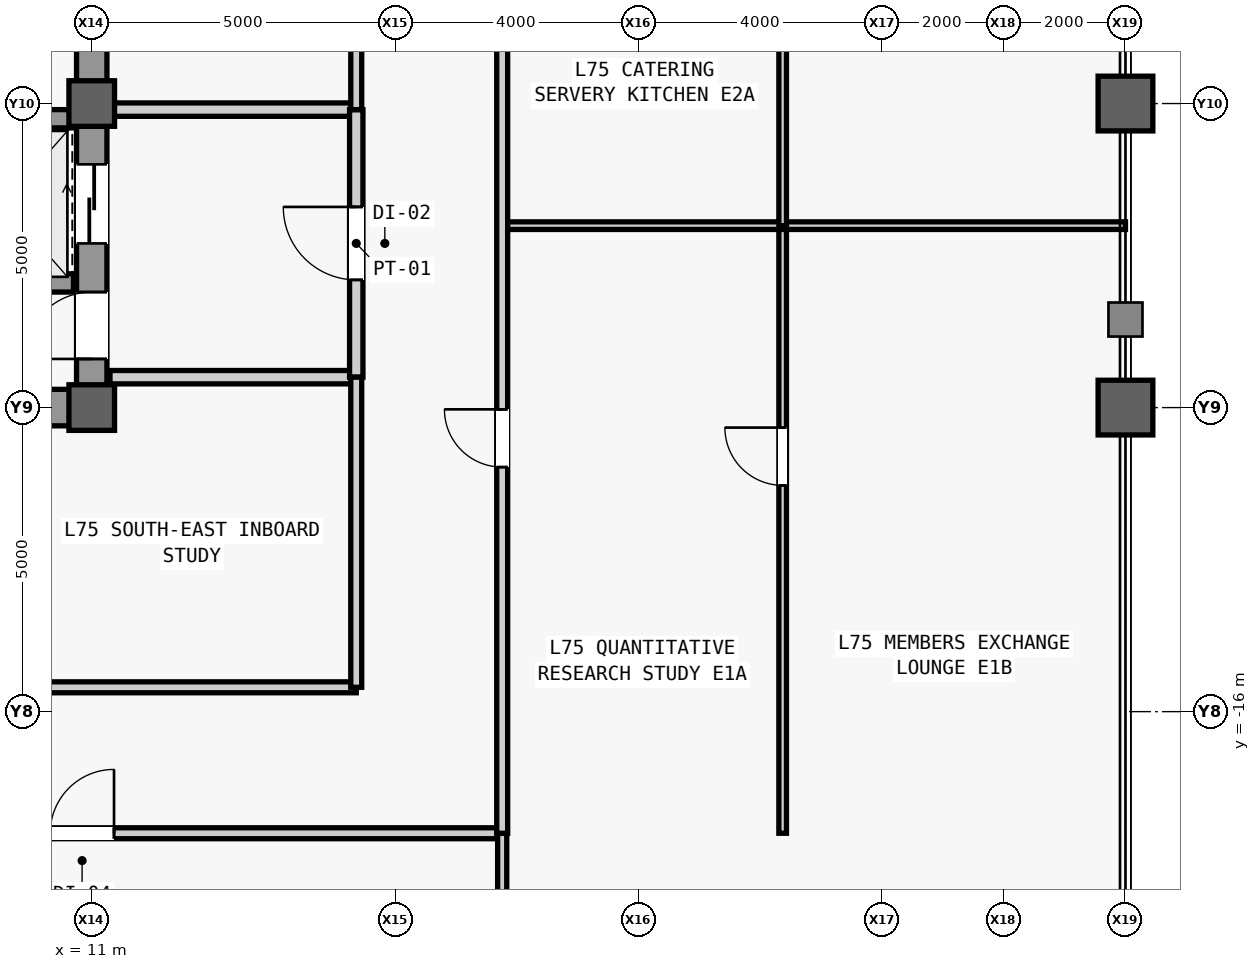
"""IFC4 building model, lengths in metres.
Left out: names, types, materials, properties, quantities, classifications, styles, units other than length and angle.
Written with IfcOpenShell. Run it as: python <this file> out.ifc"""

import sys

from ifc_helpers import new_model, si_unit, direction, frame, frame_2d, origin, origin_2d, place, context, subcontext, project, spatial, rectangle, hollow_rectangle, extrude, source, transform, mapped, element, fill, save


model = new_model("IFC4")
c1 = context("Model", 3, precision=1e-05, world=origin(), true_north=direction((0.0, 1.0)))
c2 = subcontext(c1, "Body", "Model", "MODEL_VIEW")
j1 = project(units=[si_unit("LENGTHUNIT", "METRE"), si_unit("PLANEANGLEUNIT", "RADIAN")], contexts=[c1])
p1 = place(None, origin())
s1 = spatial("IfcSite", under=j1, at=p1, CompositionType="ELEMENT")
p2 = place(p1, origin())
s2 = spatial("IfcBuilding", under=s1, at=p2, CompositionType="ELEMENT")
p3 = place(p2, frame((0.0, 0.0, 317.5)))
s3 = spatial("IfcBuildingStorey", under=s2, at=p3, CompositionType="ELEMENT", Elevation=317.5)
m1 = source(origin(), c2, "Body", "SweptSolid", [
    extrude(rectangle(XDim=22.0, YDim=0.5, at=frame_2d((11.0, 0.0))), origin(), (0.0, 0.0, 1.0), 3.78),
])
p4 = place(p3, frame((11.0, -11.0, 0.0), z_axis=(0.0, 0.0, 1.0), x_axis=(0.0, 1.0, 0.0)))
e1 = element("IfcWall", 1, at=p4, inside=s3, PredefinedType="SHEAR", context=c2, shape_type="MappedRepresentation", body=[
    mapped(m1, transform((0.0, 0.0, 0.0), scale=1.0)),
])
m2 = source(origin(), c2, "Body", "SweptSolid", [
    extrude(rectangle(XDim=1.1, YDim=2.2, at=frame_2d((0.55, 1.1))), frame((0.0, 0.26, 0.0), z_axis=(0.0, -1.0, 0.0), x_axis=(1.0, 0.0, 0.0)), (0.0, 0.0, 1.0), 0.52),
])
p5 = place(p4, frame((0.8, 0.0, 0.0)))
e2 = element("IfcOpeningElement", 2, at=p5, cuts=e1, PredefinedType="OPENING", context=c2, shape_type="MappedRepresentation", body=[
    mapped(m2, transform((0.0, 0.0, 0.0), scale=1.0)),
])
m3 = source(origin(), c2, "Body", "SweptSolid", [
    extrude(rectangle(XDim=0.9, YDim=2.15, at=frame_2d((0.45, 1.075))), frame((0.0, 0.26, 0.0), z_axis=(0.0, -1.0, 0.0), x_axis=(1.0, 0.0, 0.0)), (0.0, 0.0, 1.0), 0.52),
])
p6 = place(p4, frame((6.85, 0.0, 0.0)))
e3 = element("IfcOpeningElement", 3, at=p6, cuts=e1, PredefinedType="OPENING", context=c2, shape_type="MappedRepresentation", body=[
    mapped(m3, transform((0.0, 0.0, 0.0), scale=1.0)),
])
m4 = source(origin(), c2, "Body", "SweptSolid", [
    extrude(rectangle(XDim=1.2, YDim=2.3, at=frame_2d((0.6, 1.15))), frame((0.0, 0.26, 0.0), z_axis=(0.0, -1.0, 0.0), x_axis=(1.0, 0.0, 0.0)), (0.0, 0.0, 1.0), 0.52),
])
p7 = place(p4, frame((17.6, 0.0, 0.0)))
e4 = element("IfcOpeningElement", 4, at=p7, cuts=e1, PredefinedType="OPENING", context=c2, shape_type="MappedRepresentation", body=[
    mapped(m4, transform((0.0, 0.0, 0.0), scale=1.0)),
])
p8 = place(p4, frame((19.6, 0.0, 0.0)))
e5 = element("IfcOpeningElement", 5, at=p8, cuts=e1, PredefinedType="OPENING", context=c2, shape_type="MappedRepresentation", body=[
    mapped(m4, transform((0.0, 0.0, 0.0), scale=1.0)),
])
m5 = source(origin(), c2, "Body", "SweptSolid", [
    extrude(rectangle(XDim=1.3, YDim=2.3, at=frame_2d((0.65, 1.15))), frame((0.0, 0.26, 0.0), z_axis=(0.0, -1.0, 0.0), x_axis=(1.0, 0.0, 0.0)), (0.0, 0.0, 1.0), 0.52),
])
p9 = place(p4, frame((2.7, 0.0, 0.0)))
e6 = element("IfcOpeningElement", 6, at=p9, cuts=e1, PredefinedType="OPENING", context=c2, shape_type="MappedRepresentation", body=[
    mapped(m5, transform((0.0, 0.0, 0.0), scale=1.0)),
])
p10 = place(p4, frame((13.35, 0.0, 0.0)))
e7 = element("IfcOpeningElement", 7, at=p10, cuts=e1, PredefinedType="OPENING", context=c2, shape_type="MappedRepresentation", body=[
    mapped(m5, transform((0.0, 0.0, 0.0), scale=1.0)),
])
m6 = source(origin(), c2, "Body", "SweptSolid", [
    extrude(rectangle(XDim=5.9, YDim=0.6, at=frame_2d((2.95, 0.0))), origin(), (0.0, 0.0, 1.0), 3.78),
])
p11 = place(p3, frame((4.85, -11.0, 0.0), z_axis=(0.0, 0.0, 1.0), x_axis=(1.0, 0.0, 0.0)))
e8 = element("IfcWall", 8, at=p11, inside=s3, PredefinedType="SHEAR", context=c2, shape_type="MappedRepresentation", body=[
    mapped(m6, transform((0.0, 0.0, 0.0), scale=1.0)),
])
m7 = source(origin(), c2, "Body", "SweptSolid", [
    extrude(rectangle(XDim=0.75, YDim=0.75, at=origin_2d()), origin(), (0.0, 0.0, 1.0), 4.0),
])
for number, where, z_axis, x_axis in (
    (9, (11.0, -11.0, 0.0), (0.0, 0.0, 1.0), (1.0, 0.0, 0.0)),
    (10, (11.0, -6.0, 0.0), (0.0, 0.0, 1.0), (1.0, 0.0, 0.0)),
):
    element("IfcColumn", number, at=place(p3, frame(where, z_axis=z_axis, x_axis=x_axis)), inside=s3, PredefinedType="COLUMN", context=c2, shape_type="MappedRepresentation", body=[
        mapped(m7, transform((0.0, 0.0, 0.0), scale=1.0)),
    ])
m8 = source(origin(), c2, "Body", "SweptSolid", [
    extrude(hollow_rectangle(XDim=0.9, YDim=0.9, WallThickness=0.05, at=origin_2d()), origin(), (0.0, 0.0, 1.0), 4.0),
])
for number, where, z_axis, x_axis in (
    (11, (28.0, -11.0, 0.0), (0.0, 0.0, 1.0), (1.0, 0.0, 0.0)),
    (12, (28.0, -6.0, 0.0), (0.0, 0.0, 1.0), (1.0, 0.0, 0.0)),
):
    element("IfcColumn", number, at=place(p3, frame(where, z_axis=z_axis, x_axis=x_axis)), inside=s3, PredefinedType="COLUMN", context=c2, shape_type="MappedRepresentation", body=[
        mapped(m8, transform((0.0, 0.0, 0.0), scale=1.0)),
    ])
m9 = source(origin(), c2, "Body", "SweptSolid", [
    extrude(rectangle(XDim=2.2, YDim=0.3, at=frame_2d((1.1, 0.0))), origin(), (0.0, 0.0, 1.0), 3.78),
])
for number, where, z_axis, x_axis in (
    (13, (8.5, -8.95, 0.0), (0.0, 0.0, 1.0), (1.0, 0.0, 0.0)),
    (14, (8.5, -6.25, 0.0), (0.0, 0.0, 1.0), (1.0, 0.0, 0.0)),
):
    element("IfcWall", number, at=place(p3, frame(where, z_axis=z_axis, x_axis=x_axis)), inside=s3, PredefinedType="SHEAR", context=c2, shape_type="MappedRepresentation", body=[
        mapped(m9, transform((0.0, 0.0, 0.0), scale=1.0)),
    ])
m10 = source(origin(), c2, "Body", "SweptSolid", [
    extrude(rectangle(XDim=4.05, YDim=0.22, at=frame_2d((2.025, 0.0))), origin(), (0.0, 0.0, 1.0), 3.78),
])
p12 = place(p3, frame((11.3, -10.5, 0.0), z_axis=(0.0, 0.0, 1.0), x_axis=(1.0, 0.0, 0.0)))
e15 = element("IfcWall", 15, at=p12, inside=s3, PredefinedType="PARTITIONING", context=c2, shape_type="MappedRepresentation", body=[
    mapped(m10, transform((0.0, 0.0, 0.0), scale=1.0)),
])
m11 = source(origin(), c2, "Body", "SweptSolid", [
    extrude(rectangle(XDim=4.05, YDim=0.22, at=frame_2d((2.025, 0.0))), origin(), (0.0, 0.0, 1.0), 3.085),
])
p13 = place(p3, frame((11.3, -6.1, 0.0), z_axis=(0.0, 0.0, 1.0), x_axis=(1.0, 0.0, 0.0)))
e16 = element("IfcWall", 16, at=p13, inside=s3, PredefinedType="PARTITIONING", context=c2, shape_type="MappedRepresentation", body=[
    mapped(m11, transform((0.0, 0.0, 0.0), scale=1.0)),
])
m12 = source(origin(), c2, "Body", "SweptSolid", [
    extrude(rectangle(XDim=4.4, YDim=0.22, at=frame_2d((2.2, 0.0))), origin(), (0.0, 0.0, 1.0), 3.78),
])
p14 = place(p3, frame((15.35, -10.5, 0.0), z_axis=(0.0, 0.0, 1.0), x_axis=(0.0, 1.0, 0.0)))
e17 = element("IfcWall", 17, at=p14, inside=s3, PredefinedType="PARTITIONING", context=c2, shape_type="MappedRepresentation", body=[
    mapped(m12, transform((0.0, 0.0, 0.0), scale=1.0)),
])
m13 = source(origin(), c2, "Body", "SweptSolid", [
    extrude(rectangle(XDim=1.2, YDim=2.2, at=frame_2d((0.6, 1.1))), frame((0.0, 0.12, 0.0), z_axis=(0.0, -1.0, 0.0), x_axis=(1.0, 0.0, 0.0)), (0.0, 0.0, 1.0), 0.24),
])
p15 = place(p14, frame((1.6, 0.0, 0.0)))
e18 = element("IfcOpeningElement", 18, at=p15, cuts=e17, PredefinedType="OPENING", context=c2, shape_type="MappedRepresentation", body=[
    mapped(m13, transform((0.0, 0.0, 0.0), scale=1.0)),
])
m14 = source(origin(), c2, "Body", "SweptSolid", [
    extrude(rectangle(XDim=16.6, YDim=0.18, at=frame_2d((8.3, 0.0))), origin(), (0.0, 0.0, 1.0), 3.78),
])
p16 = place(p3, frame((15.35, -6.1, 0.0), z_axis=(0.0, 0.0, 1.0), x_axis=(0.0, 1.0, 0.0)))
e19 = element("IfcWall", 19, at=p16, inside=s3, PredefinedType="PARTITIONING", context=c2, shape_type="MappedRepresentation", body=[
    mapped(m14, transform((0.0, 0.0, 0.0), scale=1.0)),
])
m15 = source(origin(), c2, "Body", "SweptSolid", [
    extrude(rectangle(XDim=1.8, YDim=2.25, at=frame_2d((0.9, 1.125))), frame((0.0, 0.1, 0.0), z_axis=(0.0, -1.0, 0.0), x_axis=(1.0, 0.0, 0.0)), (0.0, 0.0, 1.0), 0.2),
])
p17 = place(p16, frame((2.7, 0.0, 0.0)))
e20 = element("IfcOpeningElement", 20, at=p17, cuts=e19, PredefinedType="OPENING", context=c2, shape_type="MappedRepresentation", body=[
    mapped(m15, transform((0.0, 0.0, 0.0), scale=1.0)),
])
p18 = place(p16, frame((13.0, 0.0, 0.0)))
e21 = element("IfcOpeningElement", 21, at=p18, cuts=e19, PredefinedType="OPENING", context=c2, shape_type="MappedRepresentation", body=[
    mapped(m15, transform((0.0, 0.0, 0.0), scale=1.0)),
])
m16 = source(origin(), c2, "Body", "SweptSolid", [
    extrude(rectangle(XDim=14.05, YDim=0.18, at=frame_2d((7.025, 0.0))), origin(), (0.0, 0.0, 1.0), 3.78),
])
p19 = place(p3, frame((1.3, -15.6, 0.0), z_axis=(0.0, 0.0, 1.0), x_axis=(1.0, 0.0, 0.0)))
e22 = element("IfcWall", 22, at=p19, inside=s3, PredefinedType="PARTITIONING", context=c2, shape_type="MappedRepresentation", body=[
    mapped(m16, transform((0.0, 0.0, 0.0), scale=1.0)),
])
m17 = source(origin(), c2, "Body", "SweptSolid", [
    extrude(rectangle(XDim=0.9, YDim=2.15, at=frame_2d((0.45, 1.075))), frame((0.0, 0.1, 0.0), z_axis=(0.0, -1.0, 0.0), x_axis=(1.0, 0.0, 0.0)), (0.0, 0.0, 1.0), 0.2),
])
p20 = place(p19, frame((6.25, 0.0, 0.0)))
e23 = element("IfcOpeningElement", 23, at=p20, cuts=e22, PredefinedType="OPENING", context=c2, shape_type="MappedRepresentation", body=[
    mapped(m17, transform((0.0, 0.0, 0.0), scale=1.0)),
])
m18 = source(origin(), c2, "Body", "SweptSolid", [
    extrude(rectangle(XDim=5.1, YDim=0.18, at=frame_2d((2.55, 0.0))), origin(), (0.0, 0.0, 1.0), 3.78),
])
p21 = place(p3, frame((15.35, -15.6, 0.0), z_axis=(0.0, 0.0, 1.0), x_axis=(0.0, 1.0, 0.0)))
e24 = element("IfcWall", 24, at=p21, inside=s3, PredefinedType="PARTITIONING", context=c2, shape_type="MappedRepresentation", body=[
    mapped(m18, transform((0.0, 0.0, 0.0), scale=1.0)),
])
m19 = source(origin(), c2, "Body", "SweptSolid", [
    extrude(rectangle(XDim=37.55, YDim=0.18, at=frame_2d((18.775, 0.0))), origin(), (0.0, 0.0, 1.0), 3.78),
])
p22 = place(p3, frame((-19.8, -18.0, 0.0), z_axis=(0.0, 0.0, 1.0), x_axis=(1.0, 0.0, 0.0)))
e25 = element("IfcWall", 25, at=p22, inside=s3, PredefinedType="PARTITIONING", context=c2, shape_type="MappedRepresentation", body=[
    mapped(m19, transform((0.0, 0.0, 0.0), scale=1.0)),
])
m20 = source(origin(), c2, "Body", "SweptSolid", [
    extrude(rectangle(XDim=1.05, YDim=2.2, at=frame_2d((0.525, 1.1))), frame((0.0, 0.1, 0.0), z_axis=(0.0, -1.0, 0.0), x_axis=(1.0, 0.0, 0.0)), (0.0, 0.0, 1.0), 0.2),
])
p23 = place(p22, frame((5.983, 0.0, 0.0)))
e26 = element("IfcOpeningElement", 26, at=p23, cuts=e25, PredefinedType="OPENING", context=c2, shape_type="MappedRepresentation", body=[
    mapped(m20, transform((0.0, 0.0, 0.0), scale=1.0)),
])
p24 = place(p22, frame((17.875, 0.0, 0.0)))
e27 = element("IfcOpeningElement", 27, at=p24, cuts=e25, PredefinedType="OPENING", context=c2, shape_type="MappedRepresentation", body=[
    mapped(m20, transform((0.0, 0.0, 0.0), scale=1.0)),
])
p25 = place(p22, frame((30.116, 0.0, 0.0)))
e28 = element("IfcOpeningElement", 28, at=p25, cuts=e25, PredefinedType="OPENING", context=c2, shape_type="MappedRepresentation", body=[
    mapped(m20, transform((0.0, 0.0, 0.0), scale=1.0)),
])
m21 = source(origin(), c2, "Body", "SweptSolid", [
    extrude(rectangle(XDim=10.0, YDim=0.15, at=frame_2d((5.0, 0.0))), origin(), (0.0, 0.0, 1.0), 3.78),
])
p26 = place(p3, frame((17.75, -28.0, 0.0), z_axis=(0.0, 0.0, 1.0), x_axis=(0.0, 1.0, 0.0)))
e29 = element("IfcWall", 29, at=p26, inside=s3, PredefinedType="PARTITIONING", context=c2, shape_type="MappedRepresentation", body=[
    mapped(m21, transform((0.0, 0.0, 0.0), scale=1.0)),
])
m22 = source(origin(), c2, "Body", "SweptSolid", [
    extrude(rectangle(XDim=9.992, YDim=0.125, at=frame_2d((4.996, 0.0))), origin(), (0.0, 0.0, 1.0), 3.164),
])
p27 = place(p3, frame((22.363, -18.0, 0.0), z_axis=(0.0, 0.0, 1.0), x_axis=(0.0, 1.0, 0.0)))
e30 = element("IfcWall", 30, at=p27, inside=s3, PredefinedType="PARTITIONING", context=c2, shape_type="MappedRepresentation", body=[
    mapped(m22, transform((0.0, 0.0, 0.0), scale=1.0)),
])
m23 = source(origin(), c2, "Body", "SweptSolid", [
    extrude(rectangle(XDim=0.95, YDim=2.15, at=frame_2d((0.475, 1.075))), frame((0.0, 0.073, 0.0), z_axis=(0.0, -1.0, 0.0), x_axis=(1.0, 0.0, 0.0)), (0.0, 0.0, 1.0), 0.145),
])
p28 = place(p27, frame((5.721, 0.0, 0.0)))
e31 = element("IfcOpeningElement", 31, at=p28, cuts=e30, PredefinedType="OPENING", context=c2, shape_type="MappedRepresentation", body=[
    mapped(m23, transform((0.0, 0.0, 0.0), scale=1.0)),
])
m24 = source(origin(), c2, "Body", "SweptSolid", [
    extrude(rectangle(XDim=10.25, YDim=0.125, at=frame_2d((5.125, 0.0))), origin(), (0.0, 0.0, 1.0), 3.78),
])
p29 = place(p3, frame((17.75, -8.008, 0.0), z_axis=(0.0, 0.0, 1.0), x_axis=(1.0, 0.0, 0.0)))
e32 = element("IfcWall", 32, at=p29, inside=s3, PredefinedType="PARTITIONING", context=c2, shape_type="MappedRepresentation", body=[
    mapped(m24, transform((0.0, 0.0, 0.0), scale=1.0)),
])
m25 = source(origin(), c2, "Body", "SweptSolid", [
    extrude(rectangle(XDim=9.928, YDim=0.125, at=frame_2d((4.964, 0.0))), origin(), (0.0, 0.0, 1.0), 3.78),
])
p30 = place(p3, frame((22.363, -8.008, 0.0), z_axis=(0.0, 0.0, 1.0), x_axis=(0.0, 1.0, 0.0)))
e33 = element("IfcWall", 33, at=p30, inside=s3, PredefinedType="PARTITIONING", context=c2, shape_type="MappedRepresentation", body=[
    mapped(m25, transform((0.0, 0.0, 0.0), scale=1.0)),
])
p31 = place(p30, frame((4.489, 0.0, 0.0)))
e34 = element("IfcOpeningElement", 34, at=p31, cuts=e33, PredefinedType="OPENING", context=c2, shape_type="MappedRepresentation", body=[
    mapped(m23, transform((0.0, 0.0, 0.0), scale=1.0)),
])
m26 = source(origin(), c2, "Body", "SweptSolid", [
    extrude(rectangle(XDim=40.5, YDim=0.18, at=frame_2d((20.25, 0.0))), origin(), (0.0, 0.0, 1.0), 3.78),
])
p32 = place(p3, frame((17.75, -18.0, 0.0), z_axis=(0.0, 0.0, 1.0), x_axis=(0.0, 1.0, 0.0)))
e35 = element("IfcWall", 35, at=p32, inside=s3, PredefinedType="PARTITIONING", context=c2, shape_type="MappedRepresentation", body=[
    mapped(m26, transform((0.0, 0.0, 0.0), scale=1.0)),
])
m27 = source(origin(), c2, "Body", "SweptSolid", [
    extrude(rectangle(XDim=0.95, YDim=2.15, at=frame_2d((0.475, 1.075))), frame((0.0, 0.1, 0.0), z_axis=(0.0, -1.0, 0.0), x_axis=(1.0, 0.0, 0.0)), (0.0, 0.0, 1.0), 0.2),
])
p33 = place(p32, frame((6.021, 0.0, 0.0)))
e36 = element("IfcOpeningElement", 36, at=p33, cuts=e35, PredefinedType="OPENING", context=c2, shape_type="MappedRepresentation", body=[
    mapped(m27, transform((0.0, 0.0, 0.0), scale=1.0)),
])
p34 = place(p32, frame((14.481, 0.0, 0.0)))
e37 = element("IfcOpeningElement", 37, at=p34, cuts=e35, PredefinedType="OPENING", context=c2, shape_type="MappedRepresentation", body=[
    mapped(m27, transform((0.0, 0.0, 0.0), scale=1.0)),
])
p35 = place(p32, frame((24.985, 0.0, 0.0)))
e38 = element("IfcOpeningElement", 38, at=p35, cuts=e35, PredefinedType="OPENING", context=c2, shape_type="MappedRepresentation", body=[
    mapped(m27, transform((0.0, 0.0, 0.0), scale=1.0)),
])
m28 = source(origin(), c2, "Body", "SweptSolid", [
    extrude(rectangle(XDim=1.1, YDim=2.2, at=frame_2d((0.55, 1.1))), frame((0.0, 0.025, 0.0), z_axis=(0.0, -1.0, 0.0), x_axis=(1.0, 0.0, 0.0)), (0.0, 0.0, 1.0), 0.05),
])
p36 = place(p5, origin())
e39 = element("IfcDoor", 39, at=p36, inside=s3, OperationType="SINGLE_SWING_LEFT", PredefinedType="DOOR", context=c2, shape_type="MappedRepresentation", body=[
    mapped(m28, transform((0.0, 0.0, 0.0), scale=1.0)),
])
fill(e2, e39)
m29 = source(origin(), c2, "Body", "SweptSolid", [
    extrude(rectangle(XDim=1.2, YDim=2.2, at=frame_2d((0.6, 1.1))), frame((0.0, 0.025, 0.0), z_axis=(0.0, -1.0, 0.0), x_axis=(1.0, 0.0, 0.0)), (0.0, 0.0, 1.0), 0.05),
])
p37 = place(p15, origin())
e40 = element("IfcDoor", 40, at=p37, inside=s3, OperationType="SINGLE_SWING_RIGHT", PredefinedType="DOOR", context=c2, shape_type="MappedRepresentation", body=[
    mapped(m29, transform((0.0, 0.0, 0.0), scale=1.0)),
])
fill(e18, e40)
m30 = source(origin(), c2, "Body", "SweptSolid", [
    extrude(rectangle(XDim=1.05, YDim=2.2, at=frame_2d((0.525, 1.1))), frame((0.0, 0.025, 0.0), z_axis=(0.0, -1.0, 0.0), x_axis=(1.0, 0.0, 0.0)), (0.0, 0.0, 1.0), 0.05),
])
p38 = place(p25, origin())
e41 = element("IfcDoor", 41, at=p38, inside=s3, OperationType="SINGLE_SWING_RIGHT", PredefinedType="DOOR", context=c2, shape_type="MappedRepresentation", body=[
    mapped(m30, transform((0.0, 0.0, 0.0), scale=1.0)),
])
fill(e28, e41)
m31 = source(origin(), c2, "Body", "SweptSolid", [
    extrude(rectangle(XDim=0.95, YDim=2.15, at=frame_2d((0.475, 1.075))), frame((0.0, 0.025, 0.0), z_axis=(0.0, -1.0, 0.0), x_axis=(1.0, 0.0, 0.0)), (0.0, 0.0, 1.0), 0.05),
])
p39 = place(p28, origin())
e42 = element("IfcDoor", 42, at=p39, inside=s3, OperationType="SINGLE_SWING_RIGHT", PredefinedType="DOOR", context=c2, shape_type="MappedRepresentation", body=[
    mapped(m31, transform((0.0, 0.0, 0.0), scale=1.0)),
])
fill(e31, e42)
p40 = place(p33, origin())
e43 = element("IfcDoor", 43, at=p40, inside=s3, OperationType="SINGLE_SWING_RIGHT", PredefinedType="DOOR", context=c2, shape_type="MappedRepresentation", body=[
    mapped(m31, transform((0.0, 0.0, 0.0), scale=1.0)),
])
fill(e36, e43)
m32 = source(origin(), c2, "Body", "SweptSolid", [
    extrude(rectangle(XDim=1.3, YDim=2.3, at=frame_2d((0.65, 1.15))), frame((0.0, 0.025, 0.0), z_axis=(0.0, -1.0, 0.0), x_axis=(1.0, 0.0, 0.0)), (0.0, 0.0, 1.0), 0.05),
])
p41 = place(p9, origin())
e44 = element("IfcDoor", 44, at=p41, inside=s3, OperationType="SLIDING_TO_LEFT", PredefinedType="DOOR", context=c2, shape_type="MappedRepresentation", body=[
    mapped(m32, transform((0.0, 0.0, 0.0), scale=1.0)),
])
fill(e6, e44)
save(model, sys.argv[1])
